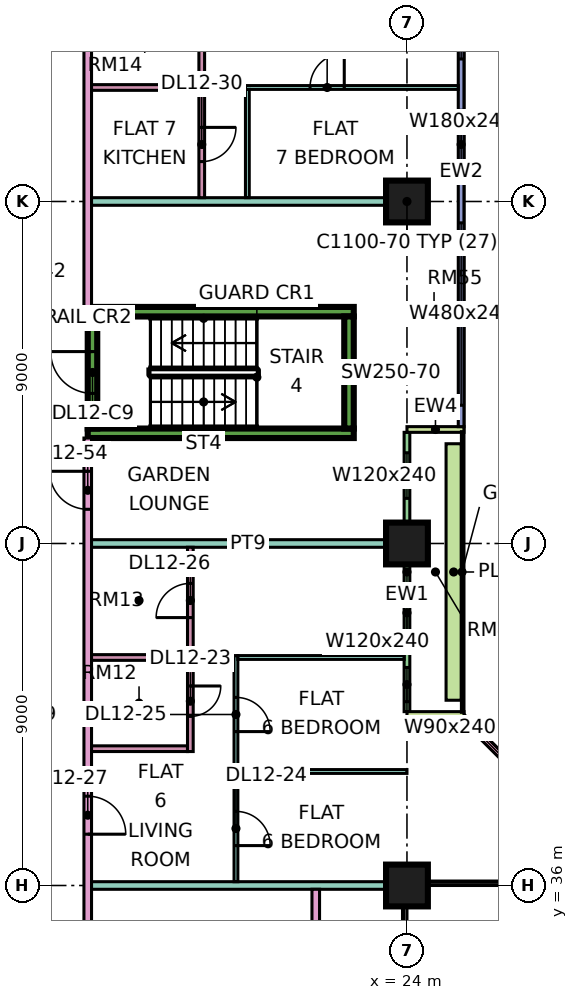
"""IFC4 building model, lengths in metres.
Left out: names, types, materials, properties, quantities, classifications, styles, units other than length and angle.
Written with IfcOpenShell. Run it as: python <this file> out.ifc"""

import sys

from ifc_helpers import new_model, si_unit, direction, frame, frame_2d, origin, origin_2d, place, context, subcontext, project, spatial, rectangle, extrude, element, fill, save


model = new_model("IFC4")
c1 = context("Model", 3, precision=1e-05, world=origin(), true_north=direction((0.0, 1.0)))
c2 = subcontext(c1, "Body", "Model", "MODEL_VIEW")
j1 = project(units=[si_unit("LENGTHUNIT", "METRE"), si_unit("PLANEANGLEUNIT", "RADIAN")], contexts=[c1])
p1 = place(None, origin())
s1 = spatial("IfcSite", under=j1, at=p1, CompositionType="ELEMENT")
p2 = place(p1, origin())
s2 = spatial("IfcBuilding", under=s1, at=p2, CompositionType="ELEMENT")
p3 = place(p2, frame((0.0, 0.0, 60.15)))
s3 = spatial("IfcBuildingStorey", under=s2, at=p3, CompositionType="ELEMENT", Elevation=60.15)
for number, where, z_axis, x_axis in (
    (1, (24.0, 36.0, 0.0), (0.0, 0.0, 1.0), (1.0, 0.0, 0.0)),
    (2, (24.0, 45.0, 0.0), (0.0, 0.0, 1.0), (1.0, 0.0, 0.0)),
    (3, (24.0, 54.0, 0.0), (0.0, 0.0, 1.0), (1.0, 0.0, 0.0)),
):
    element("IfcColumn", number, at=place(p3, frame(where, z_axis=z_axis, x_axis=x_axis)), inside=s3, PredefinedType="COLUMN", context=c2, shape_type="SweptSolid", body=[
        extrude(rectangle(XDim=1.1, YDim=1.1, at=origin_2d()), origin(), (0.0, 0.0, 1.0), 3.75),
    ])
for number, where, z_axis, x_axis in (
    (4, (15.6, 47.9, 0.0), (0.0, 0.0, 1.0), (1.0, 0.0, 0.0)),
    (5, (15.6, 51.1, 0.0), (0.0, 0.0, 1.0), (1.0, 0.0, 0.0)),
):
    element("IfcWall", number, at=place(p3, frame(where, z_axis=z_axis, x_axis=x_axis)), inside=s3, PredefinedType="SHEAR", context=c2, shape_type="SweptSolid", body=[
        extrude(rectangle(XDim=7.0, YDim=0.25, at=frame_2d((3.5, 0.0))), origin(), (0.0, 0.0, 1.0), 3.75),
    ])
p4 = place(p3, frame((15.725, 48.025, 0.0), z_axis=(0.0, 0.0, 1.0), x_axis=(0.0, 1.0, 0.0)))
e6 = element("IfcWall", 6, at=p4, inside=s3, PredefinedType="SHEAR", context=c2, shape_type="SweptSolid", body=[
    extrude(rectangle(XDim=2.95, YDim=0.25, at=frame_2d((1.475, 0.0))), origin(), (0.0, 0.0, 1.0), 3.75),
])
p5 = place(p4, frame((0.925, 0.0, 0.0)))
e7 = element("IfcOpeningElement", 7, at=p5, cuts=e6, PredefinedType="OPENING", context=c2, shape_type="SweptSolid", body=[
    extrude(rectangle(XDim=1.1, YDim=2.2, at=frame_2d((0.55, 1.1))), frame((0.0, 0.135, 0.0), z_axis=(0.0, -1.0, 0.0), x_axis=(1.0, 0.0, 0.0)), (0.0, 0.0, 1.0), 0.27),
])
p6 = place(p3, frame((22.475, 48.025, 0.0), z_axis=(0.0, 0.0, 1.0), x_axis=(0.0, 1.0, 0.0)))
e8 = element("IfcWall", 8, at=p6, inside=s3, PredefinedType="SHEAR", context=c2, shape_type="SweptSolid", body=[
    extrude(rectangle(XDim=2.95, YDim=0.25, at=frame_2d((1.475, 0.0))), origin(), (0.0, 0.0, 1.0), 3.75),
])
p7 = place(p3, frame((28.447, 37.447, 0.0), z_axis=(0.0, 0.0, 1.0), x_axis=(-0.707106781187, 0.707106781187, 0.0)))
e9 = element("IfcWall", 9, at=p7, inside=s3, PredefinedType="SOLIDWALL", context=c2, shape_type="SweptSolid", body=[
    extrude(rectangle(XDim=4.243, YDim=0.15, at=frame_2d((2.121, 0.0))), origin(), (0.0, 0.0, 1.0), 3.35),
])
p8 = place(p7, frame((0.621, 0.0, 0.45)))
e10 = element("IfcOpeningElement", 10, at=p8, cuts=e9, PredefinedType="OPENING", context=c2, shape_type="SweptSolid", body=[
    extrude(rectangle(XDim=3.0, YDim=2.4, at=frame_2d((1.5, 1.2))), frame((0.0, 0.085, 0.0), z_axis=(0.0, -1.0, 0.0), x_axis=(1.0, 0.0, 0.0)), (0.0, 0.0, 1.0), 0.17),
])
p9 = place(p3, frame((24.0, 40.575, 0.0), z_axis=(0.0, 0.0, 1.0), x_axis=(0.0, 1.0, 0.0)))
e11 = element("IfcWall", 11, at=p9, inside=s3, PredefinedType="SOLIDWALL", context=c2, shape_type="SweptSolid", body=[
    extrude(rectangle(XDim=7.35, YDim=0.15, at=frame_2d((3.675, 0.0))), origin(), (0.0, 0.0, 1.0), 3.35),
])
p10 = place(p9, frame((0.262, 0.0, 0.45)))
e12 = element("IfcOpeningElement", 12, at=p10, cuts=e11, PredefinedType="OPENING", context=c2, shape_type="SweptSolid", body=[
    extrude(rectangle(XDim=0.9, YDim=2.4, at=frame_2d((0.45, 1.2))), frame((0.0, 0.085, 0.0), z_axis=(0.0, -1.0, 0.0), x_axis=(1.0, 0.0, 0.0)), (0.0, 0.0, 1.0), 0.17),
])
p11 = place(p9, frame((2.0, 0.0, 0.45)))
e13 = element("IfcOpeningElement", 13, at=p11, cuts=e11, PredefinedType="OPENING", context=c2, shape_type="SweptSolid", body=[
    extrude(rectangle(XDim=1.2, YDim=2.4, at=frame_2d((0.6, 1.2))), frame((0.0, 0.085, 0.0), z_axis=(0.0, -1.0, 0.0), x_axis=(1.0, 0.0, 0.0)), (0.0, 0.0, 1.0), 0.17),
])
p12 = place(p9, frame((5.613, 0.0, 0.45)))
e14 = element("IfcOpeningElement", 14, at=p12, cuts=e11, PredefinedType="OPENING", context=c2, shape_type="SweptSolid", body=[
    extrude(rectangle(XDim=1.2, YDim=2.4, at=frame_2d((0.6, 1.2))), frame((0.0, 0.085, 0.0), z_axis=(0.0, -1.0, 0.0), x_axis=(1.0, 0.0, 0.0)), (0.0, 0.0, 1.0), 0.17),
])
for number, where, z_axis, x_axis in (
    (15, (25.5, 40.5, 0.0), (0.0, 0.0, 1.0), (-1.0, 0.0, 0.0)),
    (16, (25.5, 48.0, 0.0), (0.0, 0.0, 1.0), (-1.0, 0.0, 0.0)),
):
    element("IfcWall", number, at=place(p3, frame(where, z_axis=z_axis, x_axis=x_axis)), inside=s3, PredefinedType="SOLIDWALL", context=c2, shape_type="SweptSolid", body=[
        extrude(rectangle(XDim=1.5, YDim=0.15, at=frame_2d((0.75, 0.0))), origin(), (0.0, 0.0, 1.0), 3.35),
    ])
p13 = place(p3, frame((25.425, 48.075, 0.0), z_axis=(0.0, 0.0, 1.0), x_axis=(0.0, 1.0, 0.0)))
e17 = element("IfcWall", 17, at=p13, inside=s3, PredefinedType="SOLIDWALL", context=c2, shape_type="SweptSolid", body=[
    extrude(rectangle(XDim=13.425, YDim=0.15, at=frame_2d((6.712, 0.0))), origin(), (0.0, 0.0, 1.0), 3.35),
])
p14 = place(p13, frame((0.562, 0.0, 0.45)))
e18 = element("IfcOpeningElement", 18, at=p14, cuts=e17, PredefinedType="OPENING", context=c2, shape_type="SweptSolid", body=[
    extrude(rectangle(XDim=4.8, YDim=2.4, at=frame_2d((2.4, 1.2))), frame((0.0, 0.085, 0.0), z_axis=(0.0, -1.0, 0.0), x_axis=(1.0, 0.0, 0.0)), (0.0, 0.0, 1.0), 0.17),
])
p15 = place(p13, frame((6.525, 0.0, 0.45)))
e19 = element("IfcOpeningElement", 19, at=p15, cuts=e17, PredefinedType="OPENING", context=c2, shape_type="SweptSolid", body=[
    extrude(rectangle(XDim=1.8, YDim=2.4, at=frame_2d((0.9, 1.2))), frame((0.0, 0.085, 0.0), z_axis=(0.0, -1.0, 0.0), x_axis=(1.0, 0.0, 0.0)), (0.0, 0.0, 1.0), 0.17),
])
p16 = place(p13, frame((9.675, 0.0, 0.45)))
e20 = element("IfcOpeningElement", 20, at=p16, cuts=e17, PredefinedType="OPENING", context=c2, shape_type="SweptSolid", body=[
    extrude(rectangle(XDim=3.0, YDim=2.4, at=frame_2d((1.5, 1.2))), frame((0.0, 0.085, 0.0), z_axis=(0.0, -1.0, 0.0), x_axis=(1.0, 0.0, 0.0)), (0.0, 0.0, 1.0), 0.17),
])
p17 = place(p3, frame((25.229, 40.875, 0.0), z_axis=(0.0, 0.0, 1.0), x_axis=(0.0, 1.0, 0.0)))
e21 = element("IfcWall", 21, at=p17, inside=s3, PredefinedType="SOLIDWALL", context=c2, shape_type="SweptSolid", body=[
    extrude(rectangle(XDim=6.75, YDim=0.4, at=frame_2d((3.375, 0.0))), origin(), (0.0, 0.0, 1.0), 0.7),
])
p18 = place(p3, frame((15.6, 20.0, 0.0), z_axis=(0.0, 0.0, 1.0), x_axis=(0.0, 1.0, 0.0)))
e22 = element("IfcWall", 22, at=p18, inside=s3, PredefinedType="PARTITIONING", context=c2, shape_type="SweptSolid", body=[
    extrude(rectangle(XDim=27.775, YDim=0.2, at=frame_2d((13.887, 0.0))), origin(), (0.0, 0.0, 1.0), 3.35),
])
p19 = place(p18, frame((7.0, 0.0, 0.0)))
e23 = element("IfcOpeningElement", 23, at=p19, cuts=e22, PredefinedType="OPENING", context=c2, shape_type="SweptSolid", body=[
    extrude(rectangle(XDim=1.0, YDim=2.1, at=frame_2d((0.5, 1.05))), frame((0.0, 0.11, 0.0), z_axis=(0.0, -1.0, 0.0), x_axis=(1.0, 0.0, 0.0)), (0.0, 0.0, 1.0), 0.22),
])
p20 = place(p18, frame((12.95, 0.0, 0.0)))
e24 = element("IfcOpeningElement", 24, at=p20, cuts=e22, PredefinedType="OPENING", context=c2, shape_type="SweptSolid", body=[
    extrude(rectangle(XDim=1.0, YDim=2.1, at=frame_2d((0.5, 1.05))), frame((0.0, 0.11, 0.0), z_axis=(0.0, -1.0, 0.0), x_axis=(1.0, 0.0, 0.0)), (0.0, 0.0, 1.0), 0.22),
])
p21 = place(p18, frame((17.35, 0.0, 0.0)))
e25 = element("IfcOpeningElement", 25, at=p21, cuts=e22, PredefinedType="OPENING", context=c2, shape_type="SweptSolid", body=[
    extrude(rectangle(XDim=1.0, YDim=2.1, at=frame_2d((0.5, 1.05))), frame((0.0, 0.11, 0.0), z_axis=(0.0, -1.0, 0.0), x_axis=(1.0, 0.0, 0.0)), (0.0, 0.0, 1.0), 0.22),
])
p22 = place(p18, frame((1.15, 0.0, 0.0)))
e26 = element("IfcOpeningElement", 26, at=p22, cuts=e22, PredefinedType="OPENING", context=c2, shape_type="SweptSolid", body=[
    extrude(rectangle(XDim=1.8, YDim=2.1, at=frame_2d((0.9, 1.05))), frame((0.0, 0.11, 0.0), z_axis=(0.0, -1.0, 0.0), x_axis=(1.0, 0.0, 0.0)), (0.0, 0.0, 1.0), 0.22),
])
p23 = place(p18, frame((25.9, 0.0, 0.0)))
e27 = element("IfcOpeningElement", 27, at=p23, cuts=e22, PredefinedType="OPENING", context=c2, shape_type="SweptSolid", body=[
    extrude(rectangle(XDim=1.0, YDim=2.1, at=frame_2d((0.5, 1.05))), frame((0.0, 0.11, 0.0), z_axis=(0.0, -1.0, 0.0), x_axis=(1.0, 0.0, 0.0)), (0.0, 0.0, 1.0), 0.22),
])
p24 = place(p3, frame((15.6, 51.225, 0.0), z_axis=(0.0, 0.0, 1.0), x_axis=(0.0, 1.0, 0.0)))
e28 = element("IfcWall", 28, at=p24, inside=s3, PredefinedType="PARTITIONING", context=c2, shape_type="SweptSolid", body=[
    extrude(rectangle(XDim=11.701, YDim=0.2, at=frame_2d((5.851, 0.0))), origin(), (0.0, 0.0, 1.0), 3.35),
])
p25 = place(p24, frame((9.675, 0.0, 0.0)))
e29 = element("IfcOpeningElement", 29, at=p25, cuts=e28, PredefinedType="OPENING", context=c2, shape_type="SweptSolid", body=[
    extrude(rectangle(XDim=1.0, YDim=2.1, at=frame_2d((0.5, 1.05))), frame((0.0, 0.11, 0.0), z_axis=(0.0, -1.0, 0.0), x_axis=(1.0, 0.0, 0.0)), (0.0, 0.0, 1.0), 0.22),
])
p26 = place(p3, frame((15.7, 36.0, 0.0), z_axis=(0.0, 0.0, 1.0), x_axis=(1.0, 0.0, 0.0)))
e30 = element("IfcWall", 30, at=p26, inside=s3, PredefinedType="PARTITIONING", context=c2, shape_type="SweptSolid", body=[
    extrude(rectangle(XDim=8.3, YDim=0.2, at=frame_2d((4.15, 0.0))), origin(), (0.0, 0.0, 1.0), 3.35),
])
for number, where, z_axis, x_axis in (
    (31, (15.7, 39.6, 0.0), (0.0, 0.0, 1.0), (1.0, 0.0, 0.0)),
    (32, (15.7, 42.0, 0.0), (0.0, 0.0, 1.0), (1.0, 0.0, 0.0)),
):
    element("IfcWall", number, at=place(p3, frame(where, z_axis=z_axis, x_axis=x_axis)), inside=s3, PredefinedType="PARTITIONING", context=c2, shape_type="SweptSolid", body=[
        extrude(rectangle(XDim=2.525, YDim=0.15, at=frame_2d((1.263, 0.0))), origin(), (0.0, 0.0, 1.0), 3.35),
    ])
p27 = place(p3, frame((15.7, 45.0, 0.0), z_axis=(0.0, 0.0, 1.0), x_axis=(1.0, 0.0, 0.0)))
e33 = element("IfcWall", 33, at=p27, inside=s3, PredefinedType="PARTITIONING", context=c2, shape_type="SweptSolid", body=[
    extrude(rectangle(XDim=8.226, YDim=0.2, at=frame_2d((4.113, 0.0))), origin(), (0.0, 0.0, 1.0), 3.35),
])
p28 = place(p3, frame((15.7, 54.0, 0.0), z_axis=(0.0, 0.0, 1.0), x_axis=(1.0, 0.0, 0.0)))
e34 = element("IfcWall", 34, at=p28, inside=s3, PredefinedType="PARTITIONING", context=c2, shape_type="SweptSolid", body=[
    extrude(rectangle(XDim=8.3, YDim=0.2, at=frame_2d((4.15, 0.0))), origin(), (0.0, 0.0, 1.0), 3.35),
])
p29 = place(p3, frame((15.7, 57.0, 0.0), z_axis=(0.0, 0.0, 1.0), x_axis=(1.0, 0.0, 0.0)))
e35 = element("IfcWall", 35, at=p29, inside=s3, PredefinedType="PARTITIONING", context=c2, shape_type="SweptSolid", body=[
    extrude(rectangle(XDim=2.825, YDim=0.15, at=frame_2d((1.413, 0.0))), origin(), (0.0, 0.0, 1.0), 3.35),
])
p30 = place(p3, frame((18.3, 39.525, 0.0), z_axis=(0.0, 0.0, 1.0), x_axis=(0.0, 1.0, 0.0)))
e36 = element("IfcWall", 36, at=p30, inside=s3, PredefinedType="PARTITIONING", context=c2, shape_type="SweptSolid", body=[
    extrude(rectangle(XDim=5.375, YDim=0.15, at=frame_2d((2.688, 0.0))), origin(), (0.0, 0.0, 1.0), 3.35),
])
p31 = place(p30, frame((0.925, 0.0, 0.0)))
e37 = element("IfcOpeningElement", 37, at=p31, cuts=e36, PredefinedType="OPENING", context=c2, shape_type="SweptSolid", body=[
    extrude(rectangle(XDim=0.8, YDim=2.1, at=frame_2d((0.4, 1.05))), frame((0.0, 0.085, 0.0), z_axis=(0.0, -1.0, 0.0), x_axis=(1.0, 0.0, 0.0)), (0.0, 0.0, 1.0), 0.17),
])
p32 = place(p30, frame((3.525, 0.0, 0.0)))
e38 = element("IfcOpeningElement", 38, at=p32, cuts=e36, PredefinedType="OPENING", context=c2, shape_type="SweptSolid", body=[
    extrude(rectangle(XDim=0.9, YDim=2.1, at=frame_2d((0.45, 1.05))), frame((0.0, 0.085, 0.0), z_axis=(0.0, -1.0, 0.0), x_axis=(1.0, 0.0, 0.0)), (0.0, 0.0, 1.0), 0.17),
])
p33 = place(p3, frame((18.6, 54.1, 0.0), z_axis=(0.0, 0.0, 1.0), x_axis=(0.0, 1.0, 0.0)))
e39 = element("IfcWall", 39, at=p33, inside=s3, PredefinedType="PARTITIONING", context=c2, shape_type="SweptSolid", body=[
    extrude(rectangle(XDim=5.675, YDim=0.15, at=frame_2d((2.837, 0.0))), origin(), (0.0, 0.0, 1.0), 3.35),
])
p34 = place(p33, frame((0.95, 0.0, 0.0)))
e40 = element("IfcOpeningElement", 40, at=p34, cuts=e39, PredefinedType="OPENING", context=c2, shape_type="SweptSolid", body=[
    extrude(rectangle(XDim=0.9, YDim=2.1, at=frame_2d((0.45, 1.05))), frame((0.0, 0.085, 0.0), z_axis=(0.0, -1.0, 0.0), x_axis=(1.0, 0.0, 0.0)), (0.0, 0.0, 1.0), 0.17),
])
p35 = place(p3, frame((19.5, 36.1, 0.0), z_axis=(0.0, 0.0, 1.0), x_axis=(0.0, 1.0, 0.0)))
e41 = element("IfcWall", 41, at=p35, inside=s3, PredefinedType="PARTITIONING", context=c2, shape_type="SweptSolid", body=[
    extrude(rectangle(XDim=5.95, YDim=0.1, at=frame_2d((2.975, 0.0))), origin(), (0.0, 0.0, 1.0), 3.35),
])
p36 = place(p35, frame((0.95, 0.0, 0.0)))
e42 = element("IfcOpeningElement", 42, at=p36, cuts=e41, PredefinedType="OPENING", context=c2, shape_type="SweptSolid", body=[
    extrude(rectangle(XDim=0.9, YDim=2.1, at=frame_2d((0.45, 1.05))), frame((0.0, 0.06, 0.0), z_axis=(0.0, -1.0, 0.0), x_axis=(1.0, 0.0, 0.0)), (0.0, 0.0, 1.0), 0.12),
])
p37 = place(p35, frame((3.95, 0.0, 0.0)))
e43 = element("IfcOpeningElement", 43, at=p37, cuts=e41, PredefinedType="OPENING", context=c2, shape_type="SweptSolid", body=[
    extrude(rectangle(XDim=0.9, YDim=2.1, at=frame_2d((0.45, 1.05))), frame((0.0, 0.06, 0.0), z_axis=(0.0, -1.0, 0.0), x_axis=(1.0, 0.0, 0.0)), (0.0, 0.0, 1.0), 0.12),
])
p38 = place(p3, frame((19.55, 39.0, 0.0), z_axis=(0.0, 0.0, 1.0), x_axis=(1.0, 0.0, 0.0)))
e44 = element("IfcWall", 44, at=p38, inside=s3, PredefinedType="PARTITIONING", context=c2, shape_type="SweptSolid", body=[
    extrude(rectangle(XDim=4.45, YDim=0.1, at=frame_2d((2.225, 0.0))), origin(), (0.0, 0.0, 1.0), 3.35),
])
p39 = place(p3, frame((19.55, 42.0, 0.0), z_axis=(0.0, 0.0, 1.0), x_axis=(1.0, 0.0, 0.0)))
e45 = element("IfcWall", 45, at=p39, inside=s3, PredefinedType="PARTITIONING", context=c2, shape_type="SweptSolid", body=[
    extrude(rectangle(XDim=4.376, YDim=0.1, at=frame_2d((2.188, 0.0))), origin(), (0.0, 0.0, 1.0), 3.35),
])
p40 = place(p3, frame((19.75, 57.0, 0.0), z_axis=(0.0, 0.0, 1.0), x_axis=(1.0, 0.0, 0.0)))
e46 = element("IfcWall", 46, at=p40, inside=s3, PredefinedType="PARTITIONING", context=c2, shape_type="SweptSolid", body=[
    extrude(rectangle(XDim=5.6, YDim=0.1, at=frame_2d((2.8, 0.0))), origin(), (0.0, 0.0, 1.0), 3.35),
])
p41 = place(p40, frame((1.7, 0.0, 0.0)))
e47 = element("IfcOpeningElement", 47, at=p41, cuts=e46, PredefinedType="OPENING", context=c2, shape_type="SweptSolid", body=[
    extrude(rectangle(XDim=0.9, YDim=2.1, at=frame_2d((0.45, 1.05))), frame((0.0, 0.06, 0.0), z_axis=(0.0, -1.0, 0.0), x_axis=(1.0, 0.0, 0.0)), (0.0, 0.0, 1.0), 0.12),
])
p42 = place(p3, frame((19.8, 54.1, 0.0), z_axis=(0.0, 0.0, 1.0), x_axis=(0.0, 1.0, 0.0)))
e48 = element("IfcWall", 48, at=p42, inside=s3, PredefinedType="PARTITIONING", context=c2, shape_type="SweptSolid", body=[
    extrude(rectangle(XDim=2.85, YDim=0.1, at=frame_2d((1.425, 0.0))), origin(), (0.0, 0.0, 1.0), 3.35),
])
p43 = place(p3, frame((21.6, 23.9, 0.0), z_axis=(0.0, 0.0, 1.0), x_axis=(0.0, 1.0, 0.0)))
e49 = element("IfcWall", 49, at=p43, inside=s3, PredefinedType="PARTITIONING", context=c2, shape_type="SweptSolid", body=[
    extrude(rectangle(XDim=12.0, YDim=0.2, at=frame_2d((6.0, 0.0))), origin(), (0.0, 0.0, 1.0), 3.35),
])
p44 = place(p8, origin())
e50 = element("IfcWindow", 50, at=p44, inside=s3, PartitioningType="SINGLE_PANEL", PredefinedType="WINDOW", context=c2, shape_type="SweptSolid", body=[
    extrude(rectangle(XDim=3.0, YDim=2.4, at=frame_2d((1.5, 1.2))), frame((0.0, 0.03, 0.0), z_axis=(0.0, -1.0, 0.0), x_axis=(1.0, 0.0, 0.0)), (0.0, 0.0, 1.0), 0.06),
])
fill(e10, e50)
p45 = place(p10, origin())
e51 = element("IfcWindow", 51, at=p45, inside=s3, PartitioningType="SINGLE_PANEL", PredefinedType="WINDOW", context=c2, shape_type="SweptSolid", body=[
    extrude(rectangle(XDim=0.9, YDim=2.4, at=frame_2d((0.45, 1.2))), frame((0.0, 0.03, 0.0), z_axis=(0.0, -1.0, 0.0), x_axis=(1.0, 0.0, 0.0)), (0.0, 0.0, 1.0), 0.06),
])
fill(e12, e51)
p46 = place(p11, origin())
e52 = element("IfcWindow", 52, at=p46, inside=s3, PartitioningType="SINGLE_PANEL", PredefinedType="WINDOW", context=c2, shape_type="SweptSolid", body=[
    extrude(rectangle(XDim=1.2, YDim=2.4, at=frame_2d((0.6, 1.2))), frame((0.0, 0.03, 0.0), z_axis=(0.0, -1.0, 0.0), x_axis=(1.0, 0.0, 0.0)), (0.0, 0.0, 1.0), 0.06),
])
fill(e13, e52)
p47 = place(p12, origin())
e53 = element("IfcWindow", 53, at=p47, inside=s3, PartitioningType="SINGLE_PANEL", PredefinedType="WINDOW", context=c2, shape_type="SweptSolid", body=[
    extrude(rectangle(XDim=1.2, YDim=2.4, at=frame_2d((0.6, 1.2))), frame((0.0, 0.03, 0.0), z_axis=(0.0, -1.0, 0.0), x_axis=(1.0, 0.0, 0.0)), (0.0, 0.0, 1.0), 0.06),
])
fill(e14, e53)
p48 = place(p14, origin())
e54 = element("IfcWindow", 54, at=p48, inside=s3, PartitioningType="SINGLE_PANEL", PredefinedType="WINDOW", context=c2, shape_type="SweptSolid", body=[
    extrude(rectangle(XDim=4.8, YDim=2.4, at=frame_2d((2.4, 1.2))), frame((0.0, 0.03, 0.0), z_axis=(0.0, -1.0, 0.0), x_axis=(1.0, 0.0, 0.0)), (0.0, 0.0, 1.0), 0.06),
])
fill(e18, e54)
p49 = place(p15, origin())
e55 = element("IfcWindow", 55, at=p49, inside=s3, PartitioningType="SINGLE_PANEL", PredefinedType="WINDOW", context=c2, shape_type="SweptSolid", body=[
    extrude(rectangle(XDim=1.8, YDim=2.4, at=frame_2d((0.9, 1.2))), frame((0.0, 0.03, 0.0), z_axis=(0.0, -1.0, 0.0), x_axis=(1.0, 0.0, 0.0)), (0.0, 0.0, 1.0), 0.06),
])
fill(e19, e55)
p50 = place(p16, origin())
e56 = element("IfcWindow", 56, at=p50, inside=s3, PartitioningType="SINGLE_PANEL", PredefinedType="WINDOW", context=c2, shape_type="SweptSolid", body=[
    extrude(rectangle(XDim=3.0, YDim=2.4, at=frame_2d((1.5, 1.2))), frame((0.0, 0.03, 0.0), z_axis=(0.0, -1.0, 0.0), x_axis=(1.0, 0.0, 0.0)), (0.0, 0.0, 1.0), 0.06),
])
fill(e20, e56)
p51 = place(p5, frame((1.1, 0.0, 0.0), z_axis=(0.0, 0.0, 1.0), x_axis=(-1.0, 0.0, 0.0)))
e57 = element("IfcDoor", 57, at=p51, inside=s3, OperationType="SINGLE_SWING_RIGHT", PredefinedType="DOOR", context=c2, shape_type="SweptSolid", body=[
    extrude(rectangle(XDim=1.1, YDim=2.2, at=frame_2d((0.55, 1.1))), frame((0.0, 0.025, 0.0), z_axis=(0.0, -1.0, 0.0), x_axis=(1.0, 0.0, 0.0)), (0.0, 0.0, 1.0), 0.05),
])
fill(e7, e57)
p52 = place(p31, origin())
e58 = element("IfcDoor", 58, at=p52, inside=s3, OperationType="SINGLE_SWING_RIGHT", PredefinedType="DOOR", context=c2, shape_type="SweptSolid", body=[
    extrude(rectangle(XDim=0.8, YDim=2.1, at=frame_2d((0.4, 1.05))), frame((0.0, 0.025, 0.0), z_axis=(0.0, -1.0, 0.0), x_axis=(1.0, 0.0, 0.0)), (0.0, 0.0, 1.0), 0.05),
])
fill(e37, e58)
p53 = place(p36, frame((0.9, 0.0, 0.0), z_axis=(0.0, 0.0, 1.0), x_axis=(-1.0, 0.0, 0.0)))
e59 = element("IfcDoor", 59, at=p53, inside=s3, OperationType="SINGLE_SWING_LEFT", PredefinedType="DOOR", context=c2, shape_type="SweptSolid", body=[
    extrude(rectangle(XDim=0.9, YDim=2.1, at=frame_2d((0.45, 1.05))), frame((0.0, 0.025, 0.0), z_axis=(0.0, -1.0, 0.0), x_axis=(1.0, 0.0, 0.0)), (0.0, 0.0, 1.0), 0.05),
])
fill(e42, e59)
p54 = place(p37, frame((0.9, 0.0, 0.0), z_axis=(0.0, 0.0, 1.0), x_axis=(-1.0, 0.0, 0.0)))
e60 = element("IfcDoor", 60, at=p54, inside=s3, OperationType="SINGLE_SWING_LEFT", PredefinedType="DOOR", context=c2, shape_type="SweptSolid", body=[
    extrude(rectangle(XDim=0.9, YDim=2.1, at=frame_2d((0.45, 1.05))), frame((0.0, 0.025, 0.0), z_axis=(0.0, -1.0, 0.0), x_axis=(1.0, 0.0, 0.0)), (0.0, 0.0, 1.0), 0.05),
])
fill(e43, e60)
p55 = place(p32, origin())
e61 = element("IfcDoor", 61, at=p55, inside=s3, OperationType="SINGLE_SWING_LEFT", PredefinedType="DOOR", context=c2, shape_type="SweptSolid", body=[
    extrude(rectangle(XDim=0.9, YDim=2.1, at=frame_2d((0.45, 1.05))), frame((0.0, 0.025, 0.0), z_axis=(0.0, -1.0, 0.0), x_axis=(1.0, 0.0, 0.0)), (0.0, 0.0, 1.0), 0.05),
])
fill(e38, e61)
p56 = place(p21, frame((1.0, 0.0, 0.0), z_axis=(0.0, 0.0, 1.0), x_axis=(-1.0, 0.0, 0.0)))
e62 = element("IfcDoor", 62, at=p56, inside=s3, OperationType="SINGLE_SWING_LEFT", PredefinedType="DOOR", context=c2, shape_type="SweptSolid", body=[
    extrude(rectangle(XDim=1.0, YDim=2.1, at=frame_2d((0.5, 1.05))), frame((0.0, 0.025, 0.0), z_axis=(0.0, -1.0, 0.0), x_axis=(1.0, 0.0, 0.0)), (0.0, 0.0, 1.0), 0.05),
])
fill(e25, e62)
p57 = place(p41, frame((0.9, 0.0, 0.0), z_axis=(0.0, 0.0, 1.0), x_axis=(-1.0, 0.0, 0.0)))
e63 = element("IfcDoor", 63, at=p57, inside=s3, OperationType="SINGLE_SWING_RIGHT", PredefinedType="DOOR", context=c2, shape_type="SweptSolid", body=[
    extrude(rectangle(XDim=0.9, YDim=2.1, at=frame_2d((0.45, 1.05))), frame((0.0, 0.025, 0.0), z_axis=(0.0, -1.0, 0.0), x_axis=(1.0, 0.0, 0.0)), (0.0, 0.0, 1.0), 0.05),
])
fill(e47, e63)
p58 = place(p34, origin())
e64 = element("IfcDoor", 64, at=p58, inside=s3, OperationType="SINGLE_SWING_RIGHT", PredefinedType="DOOR", context=c2, shape_type="SweptSolid", body=[
    extrude(rectangle(XDim=0.9, YDim=2.1, at=frame_2d((0.45, 1.05))), frame((0.0, 0.025, 0.0), z_axis=(0.0, -1.0, 0.0), x_axis=(1.0, 0.0, 0.0)), (0.0, 0.0, 1.0), 0.05),
])
fill(e40, e64)
p59 = place(p23, frame((1.0, 0.0, 0.0), z_axis=(0.0, 0.0, 1.0), x_axis=(-1.0, 0.0, 0.0)))
e65 = element("IfcDoor", 65, at=p59, inside=s3, OperationType="SINGLE_SWING_RIGHT", PredefinedType="DOOR", context=c2, shape_type="SweptSolid", body=[
    extrude(rectangle(XDim=1.0, YDim=2.1, at=frame_2d((0.5, 1.05))), frame((0.0, 0.025, 0.0), z_axis=(0.0, -1.0, 0.0), x_axis=(1.0, 0.0, 0.0)), (0.0, 0.0, 1.0), 0.05),
])
fill(e27, e65)
save(model, sys.argv[1])
